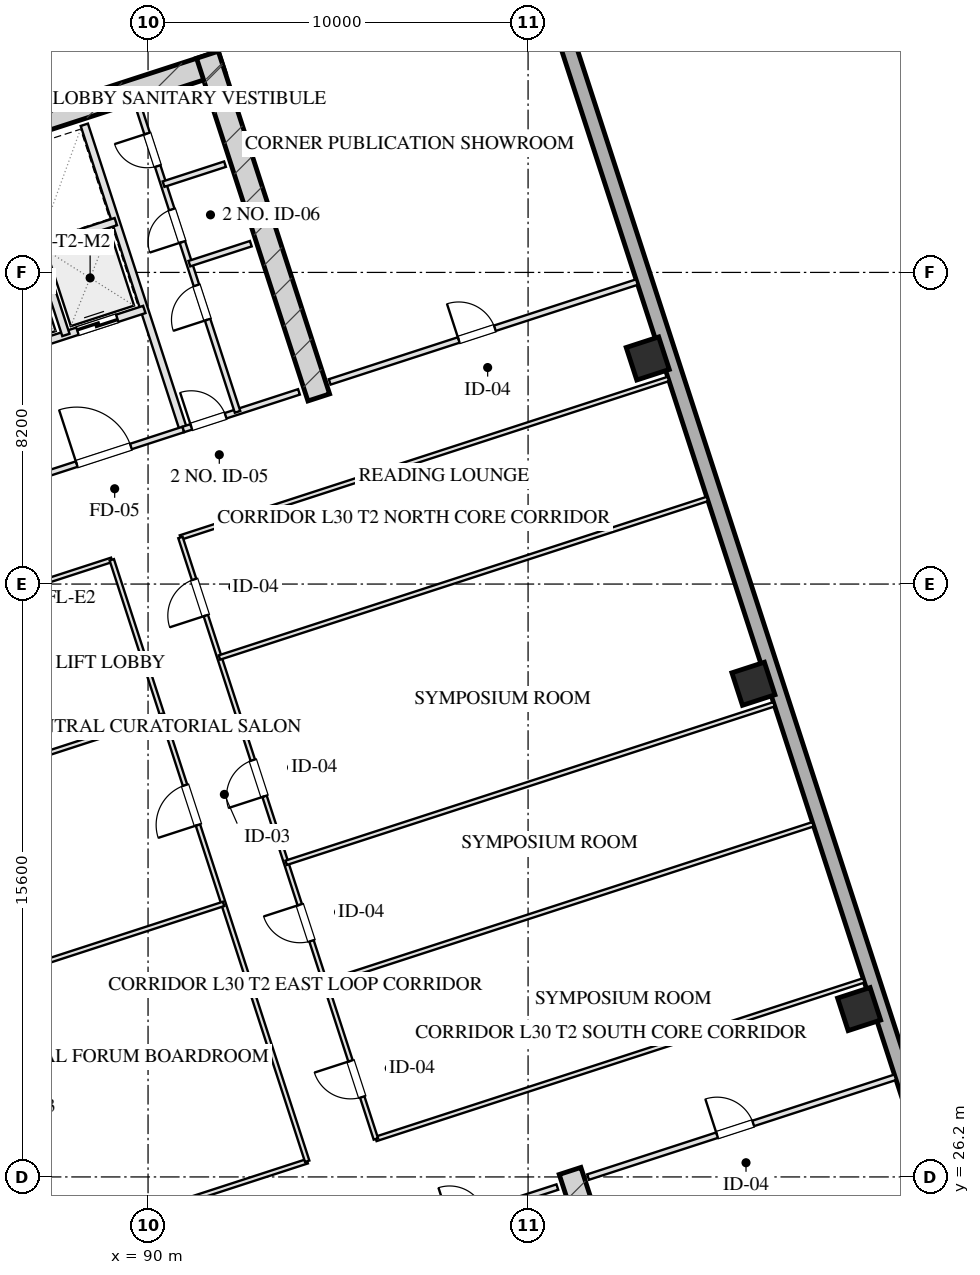
"""IFC4 building model, lengths in metres.
Left out: names, types, materials, properties, quantities, classifications, styles, units other than length and angle.
Written with IfcOpenShell. Run it as: python <this file> out.ifc"""

import sys

from ifc_helpers import new_model, si_unit, direction, frame, frame_2d, origin, origin_2d, place, context, subcontext, project, spatial, rectangle, hollow_rectangle, extrude, element, fill, save


model = new_model("IFC4")
c1 = context("Model", 3, precision=1e-05, world=origin(), true_north=direction((0.0, 1.0)))
c2 = subcontext(c1, "Body", "Model", "MODEL_VIEW")
j1 = project(units=[si_unit("LENGTHUNIT", "METRE"), si_unit("PLANEANGLEUNIT", "RADIAN")], contexts=[c1])
p1 = place(None, origin())
s1 = spatial("IfcSite", under=j1, at=p1, CompositionType="ELEMENT")
p2 = place(p1, origin())
s2 = spatial("IfcBuilding", under=s1, at=p2, CompositionType="ELEMENT")
p3 = place(p2, frame((0.0, 0.0, 117.3)))
s3 = spatial("IfcBuildingStorey", under=s2, at=p3, CompositionType="ELEMENT", Elevation=117.3)
p4 = place(p3, frame((101.105, 26.358, 0.0), z_axis=(0.0, 0.0, 1.0), x_axis=(0.309010370028, -0.95105866865, 0.0)))
e1 = element("IfcWall", 1, at=p4, inside=s3, PredefinedType="SHEAR", context=c2, shape_type="SweptSolid", body=[
    extrude(rectangle(XDim=9.48, YDim=0.6, at=frame_2d((4.74, 0.0))), origin(), (0.0, 0.0, 1.0), 3.45),
])
p5 = place(p3, frame((76.344, 50.466, 0.0), z_axis=(0.0, 0.0, 1.0), x_axis=(0.951055727519, 0.309019421968, 0.0)))
e2 = element("IfcWall", 2, at=p5, inside=s3, PredefinedType="SHEAR", context=c2, shape_type="SweptSolid", body=[
    extrude(rectangle(XDim=16.4, YDim=0.6, at=frame_2d((8.2, 0.0))), origin(), (0.0, 0.0, 1.0), 3.45),
])
p6 = place(p3, frame((94.492, 46.71, 0.0), z_axis=(0.0, 0.0, 1.0), x_axis=(-0.309010370028, 0.95105866865, 0.0)))
e3 = element("IfcWall", 3, at=p6, inside=s3, PredefinedType="SHEAR", context=c2, shape_type="SweptSolid", body=[
    extrude(rectangle(XDim=9.48, YDim=0.6, at=frame_2d((4.74, 0.0))), origin(), (0.0, 0.0, 1.0), 3.45),
])
for number, where, z_axis, x_axis in (
    (4, (108.711, 30.616, 0.0), (0.0, 0.0, 1.0), (0.951, 0.309, 0.0)),
    (5, (105.93, 39.176, 0.0), (0.0, 0.0, 1.0), (0.951, 0.309, 0.0)),
    (6, (103.149, 47.736, 0.0), (0.0, 0.0, 1.0), (0.951, 0.309, 0.0)),
):
    element("IfcColumn", number, at=place(p3, frame(where, z_axis=z_axis, x_axis=x_axis)), inside=s3, PredefinedType="COLUMN", context=c2, shape_type="SweptSolid", body=[
        extrude(hollow_rectangle(XDim=0.9, YDim=0.9, WallThickness=0.032, at=origin_2d()), origin(), (0.0, 0.0, 1.0), 3.451),
    ])
p7 = place(p3, frame((68.047, 53.995, 0.0), z_axis=(0.0, 0.0, 1.0), x_axis=(0.95105505922, 0.309021478754, 0.0)))
e7 = element("IfcWall", 7, at=p7, inside=s3, PredefinedType="SOLIDWALL", context=c2, shape_type="SweptSolid", body=[
    extrude(rectangle(XDim=29.4, YDim=0.4, at=frame_2d((14.7, 0.0))), origin(), (0.0, 0.0, 1.0), 2.61),
])
p8 = place(p3, frame((99.284, 61.41, 0.0), z_axis=(0.0, 0.0, 1.0), x_axis=(0.309017542002, -0.95105633836, 0.0)))
e8 = element("IfcWall", 8, at=p8, inside=s3, PredefinedType="SOLIDWALL", context=c2, shape_type="SweptSolid", body=[
    extrude(rectangle(XDim=46.4, YDim=0.4, at=frame_2d((23.2, 0.0))), origin(), (0.0, 0.0, 1.0), 2.61),
])
p9 = place(p3, frame((97.727, 24.944, 0.0), z_axis=(0.0, 0.0, 1.0), x_axis=(0.951036872128, 0.309077446369, 0.0)))
e9 = element("IfcWall", 9, at=p9, inside=s3, PredefinedType="PARTITIONING", context=c2, shape_type="SweptSolid", body=[
    extrude(rectangle(XDim=3.2, YDim=0.15, at=frame_2d((1.6, 0.0))), origin(), (0.0, 0.0, 1.0), 3.175),
])
p10 = place(p9, frame((0.22, 0.0, 0.0)))
e10 = element("IfcOpeningElement", 10, at=p10, cuts=e9, PredefinedType="OPENING", context=c2, shape_type="SweptSolid", body=[
    extrude(rectangle(XDim=0.95, YDim=2.05, at=frame_2d((0.475, 1.025))), frame((0.0, 0.085, 0.0), z_axis=(0.0, -1.0, 0.0), x_axis=(1.0, 0.0, 0.0)), (0.0, 0.0, 1.0), 0.17),
])
p11 = place(p3, frame((90.928, 45.868, 0.0), z_axis=(0.0, 0.0, 1.0), x_axis=(-0.309042196757, 0.951048327176, 0.0)))
e11 = element("IfcWall", 11, at=p11, inside=s3, PredefinedType="PARTITIONING", context=c2, shape_type="SweptSolid", body=[
    extrude(rectangle(XDim=8.43, YDim=0.2, at=frame_2d((4.215, 0.0))), origin(), (0.0, 0.0, 1.0), 3.175),
])
p12 = place(p3, frame((86.743, 44.508, 0.0), z_axis=(0.0, 0.0, 1.0), x_axis=(0.951063829732, 0.308994485023, 0.0)))
e12 = element("IfcWall", 12, at=p12, inside=s3, PredefinedType="PARTITIONING", context=c2, shape_type="SweptSolid", body=[
    extrude(rectangle(XDim=4.4, YDim=0.15, at=frame_2d((2.2, 0.0))), origin(), (0.0, 0.0, 1.0), 3.175),
])
p13 = place(p12, frame((1.45, 0.0, 0.0)))
e13 = element("IfcOpeningElement", 13, at=p13, cuts=e12, PredefinedType="OPENING", context=c2, shape_type="SweptSolid", body=[
    extrude(rectangle(XDim=1.5, YDim=2.05, at=frame_2d((0.75, 1.025))), frame((0.0, 0.085, 0.0), z_axis=(0.0, -1.0, 0.0), x_axis=(1.0, 0.0, 0.0)), (0.0, 0.0, 1.0), 0.17),
])
p14 = place(p3, frame((85.718, 47.666, 0.0), z_axis=(0.0, 0.0, 1.0), x_axis=(0.951058531764, 0.30901079133, 0.0)))
e14 = element("IfcWall", 14, at=p14, inside=s3, PredefinedType="PARTITIONING", context=c2, shape_type="SweptSolid", body=[
    extrude(rectangle(XDim=4.4, YDim=0.2, at=frame_2d((2.2, 0.0))), origin(), (0.0, 0.0, 1.0), 3.175),
])
p15 = place(p14, frame((0.45, 0.0, 0.0)))
e15 = element("IfcOpeningElement", 15, at=p15, cuts=e14, PredefinedType="OPENING", context=c2, shape_type="SweptSolid", body=[
    extrude(rectangle(XDim=1.1, YDim=2.05, at=frame_2d((0.55, 1.025))), frame((0.0, 0.11, 0.0), z_axis=(0.0, -1.0, 0.0), x_axis=(1.0, 0.0, 0.0)), (0.0, 0.0, 1.0), 0.22),
])
p16 = place(p14, frame((2.55, 0.0, 0.0)))
e16 = element("IfcOpeningElement", 16, at=p16, cuts=e14, PredefinedType="OPENING", context=c2, shape_type="SweptSolid", body=[
    extrude(rectangle(XDim=1.1, YDim=2.05, at=frame_2d((0.55, 1.025))), frame((0.0, 0.11, 0.0), z_axis=(0.0, -1.0, 0.0), x_axis=(1.0, 0.0, 0.0)), (0.0, 0.0, 1.0), 0.22),
])
p17 = place(p3, frame((87.838, 48.354, 0.0), z_axis=(0.0, 0.0, 1.0), x_axis=(-0.3090093719, 0.951058992953, 0.0)))
e17 = element("IfcWall", 17, at=p17, inside=s3, PredefinedType="PARTITIONING", context=c2, shape_type="SweptSolid", body=[
    extrude(rectangle(XDim=5.11, YDim=0.2, at=frame_2d((2.555, 0.0))), origin(), (0.0, 0.0, 1.0), 3.175),
])
p18 = place(p3, frame((84.967, 49.977, 0.0), z_axis=(0.0, 0.0, 1.0), x_axis=(0.951063829732, 0.308994485023, 0.0)))
e18 = element("IfcWall", 18, at=p18, inside=s3, PredefinedType="PARTITIONING", context=c2, shape_type="SweptSolid", body=[
    extrude(rectangle(XDim=4.4, YDim=0.2, at=frame_2d((2.2, 0.0))), origin(), (0.0, 0.0, 1.0), 3.175),
])
p19 = place(p3, frame((90.928, 45.868, 0.0), z_axis=(0.0, 0.0, 1.0), x_axis=(0.951059297078, 0.309008435874, 0.0)))
e19 = element("IfcWall", 19, at=p19, inside=s3, PredefinedType="PARTITIONING", context=c2, shape_type="SweptSolid", body=[
    extrude(rectangle(XDim=3.2, YDim=0.15, at=frame_2d((1.6, 0.0))), origin(), (0.0, 0.0, 1.0), 3.175),
])
p20 = place(p19, frame((0.22, 0.0, 0.0)))
e20 = element("IfcOpeningElement", 20, at=p20, cuts=e19, PredefinedType="OPENING", context=c2, shape_type="SweptSolid", body=[
    extrude(rectangle(XDim=0.95, YDim=2.05, at=frame_2d((0.475, 1.025))), frame((0.0, 0.085, 0.0), z_axis=(0.0, -1.0, 0.0), x_axis=(1.0, 0.0, 0.0)), (0.0, 0.0, 1.0), 0.17),
])
p21 = place(p3, frame((92.355, 46.331, 0.0), z_axis=(0.0, 0.0, 1.0), x_axis=(-0.309007490203, 0.951059604335, 0.0)))
e21 = element("IfcWall", 21, at=p21, inside=s3, PredefinedType="PARTITIONING", context=c2, shape_type="SweptSolid", body=[
    extrude(rectangle(XDim=8.43, YDim=0.15, at=frame_2d((4.215, 0.0))), origin(), (0.0, 0.0, 1.0), 3.175),
])
p22 = place(p21, frame((2.55, 0.0, 0.0)))
e22 = element("IfcOpeningElement", 22, at=p22, cuts=e21, PredefinedType="OPENING", context=c2, shape_type="SweptSolid", body=[
    extrude(rectangle(XDim=0.95, YDim=2.05, at=frame_2d((0.475, 1.025))), frame((0.0, 0.085, 0.0), z_axis=(0.0, -1.0, 0.0), x_axis=(1.0, 0.0, 0.0)), (0.0, 0.0, 1.0), 0.17),
])
p23 = place(p21, frame((4.7, 0.0, 0.0)))
e23 = element("IfcOpeningElement", 23, at=p23, cuts=e21, PredefinedType="OPENING", context=c2, shape_type="SweptSolid", body=[
    extrude(rectangle(XDim=0.9, YDim=2.05, at=frame_2d((0.45, 1.025))), frame((0.0, 0.085, 0.0), z_axis=(0.0, -1.0, 0.0), x_axis=(1.0, 0.0, 0.0)), (0.0, 0.0, 1.0), 0.17),
])
p24 = place(p21, frame((6.8, 0.0, 0.0)))
e24 = element("IfcOpeningElement", 24, at=p24, cuts=e21, PredefinedType="OPENING", context=c2, shape_type="SweptSolid", body=[
    extrude(rectangle(XDim=0.9, YDim=2.05, at=frame_2d((0.45, 1.025))), frame((0.0, 0.085, 0.0), z_axis=(0.0, -1.0, 0.0), x_axis=(1.0, 0.0, 0.0)), (0.0, 0.0, 1.0), 0.17),
])
p25 = place(p3, frame((91.088, 50.23, 0.0), z_axis=(0.0, 0.0, 1.0), x_axis=(0.951054116971, 0.309024378638, 0.0)))
e25 = element("IfcWall", 25, at=p25, inside=s3, PredefinedType="PARTITIONING", context=c2, shape_type="SweptSolid", body=[
    extrude(rectangle(XDim=1.7, YDim=0.15, at=frame_2d((0.85, 0.0))), origin(), (0.0, 0.0, 1.0), 3.175),
])
p26 = place(p3, frame((90.408, 52.323, 0.0), z_axis=(0.0, 0.0, 1.0), x_axis=(0.951040401051, 0.309066587596, 0.0)))
e26 = element("IfcWall", 26, at=p26, inside=s3, PredefinedType="PARTITIONING", context=c2, shape_type="SweptSolid", body=[
    extrude(rectangle(XDim=1.7, YDim=0.15, at=frame_2d((0.85, 0.0))), origin(), (0.0, 0.0, 1.0), 3.175),
])
p27 = place(p3, frame((101.578, 26.196, 0.0), z_axis=(0.0, 0.0, 1.0), x_axis=(0.951062770994, 0.308997743729, 0.0)))
e27 = element("IfcWall", 27, at=p27, inside=s3, PredefinedType="PARTITIONING", context=c2, shape_type="SweptSolid", body=[
    extrude(rectangle(XDim=8.5, YDim=0.15, at=frame_2d((4.25, 0.0))), origin(), (0.0, 0.0, 1.0), 3.175),
])
p28 = place(p27, frame((3.57, 0.0, 0.0)))
e28 = element("IfcOpeningElement", 28, at=p28, cuts=e27, PredefinedType="OPENING", context=c2, shape_type="SweptSolid", body=[
    extrude(rectangle(XDim=1.0, YDim=2.05, at=frame_2d((0.5, 1.025))), frame((0.0, 0.085, 0.0), z_axis=(0.0, -1.0, 0.0), x_axis=(1.0, 0.0, 0.0)), (0.0, 0.0, 1.0), 0.17),
])
p29 = place(p3, frame((94.78, 47.119, 0.0), z_axis=(0.0, 0.0, 1.0), x_axis=(0.951054329824, 0.309023723562, 0.0)))
e29 = element("IfcWall", 29, at=p29, inside=s3, PredefinedType="PARTITIONING", context=c2, shape_type="SweptSolid", body=[
    extrude(rectangle(XDim=8.5, YDim=0.15, at=frame_2d((4.25, 0.0))), origin(), (0.0, 0.0, 1.0), 3.175),
])
p30 = place(p29, frame((3.57, 0.0, 0.0)))
e30 = element("IfcOpeningElement", 30, at=p30, cuts=e29, PredefinedType="OPENING", context=c2, shape_type="SweptSolid", body=[
    extrude(rectangle(XDim=1.0, YDim=2.05, at=frame_2d((0.5, 1.025))), frame((0.0, 0.085, 0.0), z_axis=(0.0, -1.0, 0.0), x_axis=(1.0, 0.0, 0.0)), (0.0, 0.0, 1.0), 0.17),
])
p31 = place(p3, frame((86.675, 24.171, 0.0), z_axis=(0.0, 0.0, 1.0), x_axis=(0.951057231385, 0.309014793547, 0.0)))
e31 = element("IfcWall", 31, at=p31, inside=s3, PredefinedType="PARTITIONING", context=c2, shape_type="SweptSolid", body=[
    extrude(rectangle(XDim=7.9, YDim=0.12, at=frame_2d((3.95, 0.0))), origin(), (0.0, 0.0, 1.0), 3.175),
])
p32 = place(p3, frame((95.995, 27.2, 0.0), z_axis=(0.0, 0.0, 1.0), x_axis=(0.951057589409, 0.309013691651, 0.0)))
e32 = element("IfcWall", 32, at=p32, inside=s3, PredefinedType="PARTITIONING", context=c2, shape_type="SweptSolid", body=[
    extrude(rectangle(XDim=13.5, YDim=0.12, at=frame_2d((6.75, 0.0))), origin(), (0.0, 0.0, 1.0), 3.175),
])
p33 = place(p3, frame((81.532, 39.997, 0.0), z_axis=(0.0, 0.0, 1.0), x_axis=(0.951048148493, 0.309042746635, 0.0)))
e33 = element("IfcWall", 33, at=p33, inside=s3, PredefinedType="PARTITIONING", context=c2, shape_type="SweptSolid", body=[
    extrude(rectangle(XDim=7.9, YDim=0.12, at=frame_2d((3.95, 0.0))), origin(), (0.0, 0.0, 1.0), 3.175),
])
p34 = place(p3, frame((90.853, 43.025, 0.0), z_axis=(0.0, 0.0, 1.0), x_axis=(0.951054001411, 0.309024734286, 0.0)))
e34 = element("IfcWall", 34, at=p34, inside=s3, PredefinedType="PARTITIONING", context=c2, shape_type="SweptSolid", body=[
    extrude(rectangle(XDim=13.5, YDim=0.12, at=frame_2d((6.75, 0.0))), origin(), (0.0, 0.0, 1.0), 3.175),
])
p35 = place(p3, frame((94.188, 26.613, 0.0), z_axis=(0.0, 0.0, 1.0), x_axis=(-0.30901773025, 0.951056277195, 0.0)))
e35 = element("IfcWall", 35, at=p35, inside=s3, PredefinedType="PARTITIONING", context=c2, shape_type="SweptSolid", body=[
    extrude(rectangle(XDim=16.64, YDim=0.12, at=frame_2d((8.32, 0.0))), origin(), (0.0, 0.0, 1.0), 3.175),
])
p36 = place(p35, frame((9.304, 0.0, 0.0)))
e36 = element("IfcOpeningElement", 36, at=p36, cuts=e35, PredefinedType="OPENING", context=c2, shape_type="SweptSolid", body=[
    extrude(rectangle(XDim=1.1, YDim=2.05, at=frame_2d((0.55, 1.025))), frame((0.0, 0.07, 0.0), z_axis=(0.0, -1.0, 0.0), x_axis=(1.0, 0.0, 0.0)), (0.0, 0.0, 1.0), 0.14),
])
p37 = place(p3, frame((95.995, 27.2, 0.0), z_axis=(0.0, 0.0, 1.0), x_axis=(-0.309022042254, 0.951054876125, 0.0)))
e37 = element("IfcWall", 37, at=p37, inside=s3, PredefinedType="PARTITIONING", context=c2, shape_type="SweptSolid", body=[
    extrude(rectangle(XDim=16.64, YDim=0.12, at=frame_2d((8.32, 0.0))), origin(), (0.0, 0.0, 1.0), 3.175),
])
p38 = place(p37, frame((1.16, 0.0, 0.0)))
e38 = element("IfcOpeningElement", 38, at=p38, cuts=e37, PredefinedType="OPENING", context=c2, shape_type="SweptSolid", body=[
    extrude(rectangle(XDim=1.0, YDim=2.05, at=frame_2d((0.5, 1.025))), frame((0.0, 0.07, 0.0), z_axis=(0.0, -1.0, 0.0), x_axis=(1.0, 0.0, 0.0)), (0.0, 0.0, 1.0), 0.14),
])
p39 = place(p37, frame((5.48, 0.0, 0.0)))
e39 = element("IfcOpeningElement", 39, at=p39, cuts=e37, PredefinedType="OPENING", context=c2, shape_type="SweptSolid", body=[
    extrude(rectangle(XDim=1.0, YDim=2.05, at=frame_2d((0.5, 1.025))), frame((0.0, 0.07, 0.0), z_axis=(0.0, -1.0, 0.0), x_axis=(1.0, 0.0, 0.0)), (0.0, 0.0, 1.0), 0.14),
])
p40 = place(p37, frame((9.48, 0.0, 0.0)))
e40 = element("IfcOpeningElement", 40, at=p40, cuts=e37, PredefinedType="OPENING", context=c2, shape_type="SweptSolid", body=[
    extrude(rectangle(XDim=1.0, YDim=2.05, at=frame_2d((0.5, 1.025))), frame((0.0, 0.07, 0.0), z_axis=(0.0, -1.0, 0.0), x_axis=(1.0, 0.0, 0.0)), (0.0, 0.0, 1.0), 0.14),
])
p41 = place(p37, frame((14.48, 0.0, 0.0)))
e41 = element("IfcOpeningElement", 41, at=p41, cuts=e37, PredefinedType="OPENING", context=c2, shape_type="SweptSolid", body=[
    extrude(rectangle(XDim=1.0, YDim=2.05, at=frame_2d((0.5, 1.025))), frame((0.0, 0.07, 0.0), z_axis=(0.0, -1.0, 0.0), x_axis=(1.0, 0.0, 0.0)), (0.0, 0.0, 1.0), 0.14),
])
for number, where, z_axis, x_axis in (
    (42, (84.474, 30.943, 0.0), (0.0, 0.0, 1.0), (0.951, 0.309, 0.0)),
    (43, (82.867, 35.888, 0.0), (0.0, 0.0, 1.0), (0.951, 0.309, 0.0)),
):
    element("IfcWall", number, at=place(p3, frame(where, z_axis=z_axis, x_axis=x_axis)), inside=s3, PredefinedType="PARTITIONING", context=c2, shape_type="SweptSolid", body=[
        extrude(rectangle(XDim=7.9, YDim=0.12, at=frame_2d((3.95, 0.0))), origin(), (0.0, 0.0, 1.0), 3.175),
    ])
for number, where, z_axis, x_axis in (
    (44, (94.66, 31.308, 0.0), (0.0, 0.0, 1.0), (0.951, 0.309, 0.0)),
    (45, (93.634, 34.466, 0.0), (0.0, 0.0, 1.0), (0.951, 0.309, 0.0)),
):
    element("IfcWall", number, at=place(p3, frame(where, z_axis=z_axis, x_axis=x_axis)), inside=s3, PredefinedType="PARTITIONING", context=c2, shape_type="SweptSolid", body=[
        extrude(rectangle(XDim=13.5, YDim=0.12, at=frame_2d((6.75, 0.0))), origin(), (0.0, 0.0, 1.0), 3.175),
    ])
p42 = place(p3, frame((91.879, 39.868, 0.0), z_axis=(0.0, 0.0, 1.0), x_axis=(0.951054001411, 0.309024734286, 0.0)))
e46 = element("IfcWall", 46, at=p42, inside=s3, PredefinedType="PARTITIONING", context=c2, shape_type="SweptSolid", body=[
    extrude(rectangle(XDim=13.5, YDim=0.12, at=frame_2d((6.75, 0.0))), origin(), (0.0, 0.0, 1.0), 3.175),
])
p43 = place(p13, origin())
e47 = element("IfcDoor", 47, at=p43, inside=s3, OperationType="SINGLE_SWING_LEFT", PredefinedType="DOOR", context=c2, shape_type="SweptSolid", body=[
    extrude(rectangle(XDim=1.5, YDim=2.05, at=frame_2d((0.75, 1.025))), frame((0.0, 0.025, 0.0), z_axis=(0.0, -1.0, 0.0), x_axis=(1.0, 0.0, 0.0)), (0.0, 0.0, 1.0), 0.05),
])
fill(e13, e47)
p44 = place(p16, origin())
e48 = element("IfcDoor", 48, at=p44, inside=s3, OperationType="DOUBLE_DOOR_SLIDING", PredefinedType="DOOR", context=c2, shape_type="SweptSolid", body=[
    extrude(rectangle(XDim=1.1, YDim=2.05, at=frame_2d((0.55, 1.025))), frame((0.0, 0.025, 0.0), z_axis=(0.0, -1.0, 0.0), x_axis=(1.0, 0.0, 0.0)), (0.0, 0.0, 1.0), 0.05),
])
fill(e16, e48)
p45 = place(p20, origin())
e49 = element("IfcDoor", 49, at=p45, inside=s3, OperationType="SINGLE_SWING_LEFT", PredefinedType="DOOR", context=c2, shape_type="SweptSolid", body=[
    extrude(rectangle(XDim=0.95, YDim=2.05, at=frame_2d((0.475, 1.025))), frame((0.0, 0.025, 0.0), z_axis=(0.0, -1.0, 0.0), x_axis=(1.0, 0.0, 0.0)), (0.0, 0.0, 1.0), 0.05),
])
fill(e20, e49)
p46 = place(p22, origin())
e50 = element("IfcDoor", 50, at=p46, inside=s3, OperationType="SINGLE_SWING_LEFT", PredefinedType="DOOR", context=c2, shape_type="SweptSolid", body=[
    extrude(rectangle(XDim=0.95, YDim=2.05, at=frame_2d((0.475, 1.025))), frame((0.0, 0.025, 0.0), z_axis=(0.0, -1.0, 0.0), x_axis=(1.0, 0.0, 0.0)), (0.0, 0.0, 1.0), 0.05),
])
fill(e22, e50)
p47 = place(p23, origin())
e51 = element("IfcDoor", 51, at=p47, inside=s3, OperationType="SINGLE_SWING_LEFT", PredefinedType="DOOR", context=c2, shape_type="SweptSolid", body=[
    extrude(rectangle(XDim=0.9, YDim=2.05, at=frame_2d((0.45, 1.025))), frame((0.0, 0.025, 0.0), z_axis=(0.0, -1.0, 0.0), x_axis=(1.0, 0.0, 0.0)), (0.0, 0.0, 1.0), 0.05),
])
fill(e23, e51)
p48 = place(p24, origin())
e52 = element("IfcDoor", 52, at=p48, inside=s3, OperationType="SINGLE_SWING_RIGHT", PredefinedType="DOOR", context=c2, shape_type="SweptSolid", body=[
    extrude(rectangle(XDim=0.9, YDim=2.05, at=frame_2d((0.45, 1.025))), frame((0.0, 0.025, 0.0), z_axis=(0.0, -1.0, 0.0), x_axis=(1.0, 0.0, 0.0)), (0.0, 0.0, 1.0), 0.05),
])
fill(e24, e52)
p49 = place(p28, origin())
e53 = element("IfcDoor", 53, at=p49, inside=s3, OperationType="SINGLE_SWING_LEFT", PredefinedType="DOOR", context=c2, shape_type="SweptSolid", body=[
    extrude(rectangle(XDim=1.0, YDim=2.05, at=frame_2d((0.5, 1.025))), frame((0.0, 0.025, 0.0), z_axis=(0.0, -1.0, 0.0), x_axis=(1.0, 0.0, 0.0)), (0.0, 0.0, 1.0), 0.05),
])
fill(e28, e53)
p50 = place(p30, origin())
e54 = element("IfcDoor", 54, at=p50, inside=s3, OperationType="SINGLE_SWING_LEFT", PredefinedType="DOOR", context=c2, shape_type="SweptSolid", body=[
    extrude(rectangle(XDim=1.0, YDim=2.05, at=frame_2d((0.5, 1.025))), frame((0.0, 0.025, 0.0), z_axis=(0.0, -1.0, 0.0), x_axis=(1.0, 0.0, 0.0)), (0.0, 0.0, 1.0), 0.05),
])
fill(e30, e54)
p51 = place(p36, origin())
e55 = element("IfcDoor", 55, at=p51, inside=s3, OperationType="SINGLE_SWING_LEFT", PredefinedType="DOOR", context=c2, shape_type="SweptSolid", body=[
    extrude(rectangle(XDim=1.1, YDim=2.05, at=frame_2d((0.55, 1.025))), frame((0.0, 0.025, 0.0), z_axis=(0.0, -1.0, 0.0), x_axis=(1.0, 0.0, 0.0)), (0.0, 0.0, 1.0), 0.05),
])
fill(e36, e55)
p52 = place(p38, origin())
e56 = element("IfcDoor", 56, at=p52, inside=s3, OperationType="SINGLE_SWING_RIGHT", PredefinedType="DOOR", context=c2, shape_type="SweptSolid", body=[
    extrude(rectangle(XDim=1.0, YDim=2.05, at=frame_2d((0.5, 1.025))), frame((0.0, 0.025, 0.0), z_axis=(0.0, -1.0, 0.0), x_axis=(1.0, 0.0, 0.0)), (0.0, 0.0, 1.0), 0.05),
])
fill(e38, e56)
p53 = place(p39, origin())
e57 = element("IfcDoor", 57, at=p53, inside=s3, OperationType="SINGLE_SWING_RIGHT", PredefinedType="DOOR", context=c2, shape_type="SweptSolid", body=[
    extrude(rectangle(XDim=1.0, YDim=2.05, at=frame_2d((0.5, 1.025))), frame((0.0, 0.025, 0.0), z_axis=(0.0, -1.0, 0.0), x_axis=(1.0, 0.0, 0.0)), (0.0, 0.0, 1.0), 0.05),
])
fill(e39, e57)
p54 = place(p40, origin())
e58 = element("IfcDoor", 58, at=p54, inside=s3, OperationType="SINGLE_SWING_LEFT", PredefinedType="DOOR", context=c2, shape_type="SweptSolid", body=[
    extrude(rectangle(XDim=1.0, YDim=2.05, at=frame_2d((0.5, 1.025))), frame((0.0, 0.025, 0.0), z_axis=(0.0, -1.0, 0.0), x_axis=(1.0, 0.0, 0.0)), (0.0, 0.0, 1.0), 0.05),
])
fill(e40, e58)
p55 = place(p41, origin())
e59 = element("IfcDoor", 59, at=p55, inside=s3, OperationType="SINGLE_SWING_LEFT", PredefinedType="DOOR", context=c2, shape_type="SweptSolid", body=[
    extrude(rectangle(XDim=1.0, YDim=2.05, at=frame_2d((0.5, 1.025))), frame((0.0, 0.025, 0.0), z_axis=(0.0, -1.0, 0.0), x_axis=(1.0, 0.0, 0.0)), (0.0, 0.0, 1.0), 0.05),
])
fill(e41, e59)
save(model, sys.argv[1])
